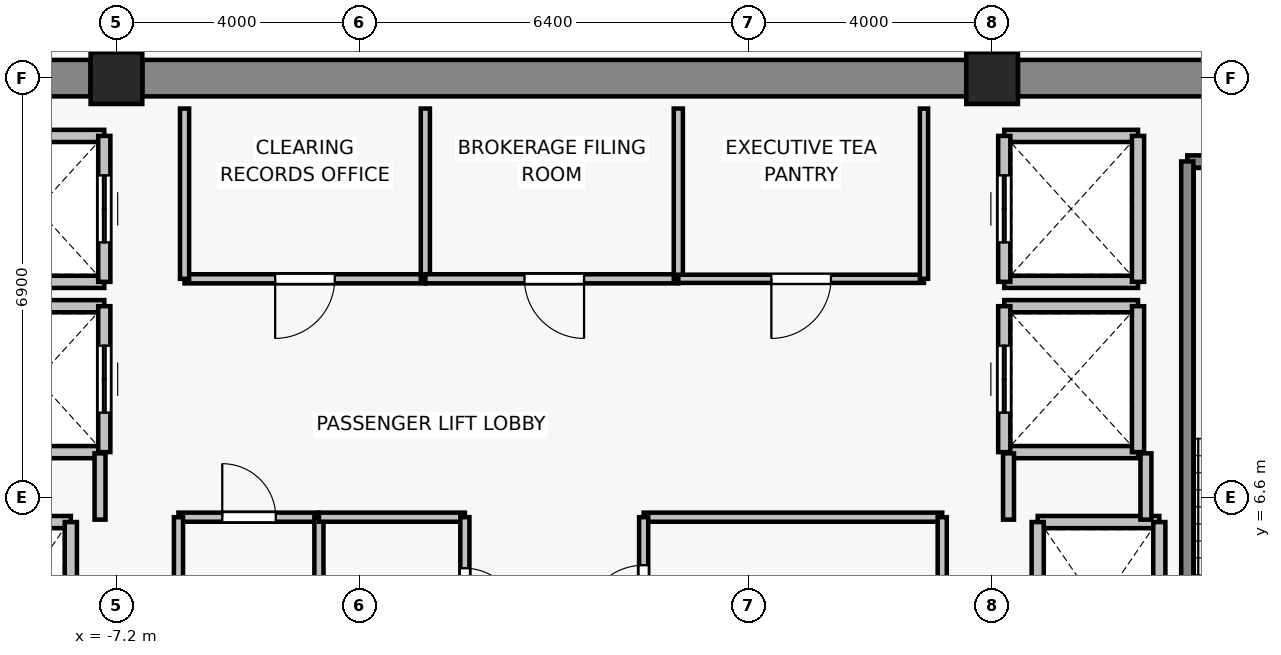
"""IFC4 building model, lengths in metres.
Left out: names, types, materials, properties, quantities, classifications, styles, units other than length and angle.
Written with IfcOpenShell. Run it as: python <this file> out.ifc"""

import sys

from ifc_helpers import new_model, si_unit, direction, frame, frame_2d, origin, origin_2d, place, context, subcontext, project, spatial, rectangle, extrude, source, transform, mapped, element, fill, save


model = new_model("IFC4")
c1 = context("Model", 3, precision=1e-05, world=origin(), true_north=direction((0.0, 1.0)))
c2 = subcontext(c1, "Body", "Model", "MODEL_VIEW")
j1 = project(units=[si_unit("LENGTHUNIT", "METRE"), si_unit("PLANEANGLEUNIT", "RADIAN")], contexts=[c1])
p1 = place(None, origin())
s1 = spatial("IfcSite", under=j1, at=p1, CompositionType="ELEMENT")
p2 = place(p1, origin())
s2 = spatial("IfcBuilding", under=s1, at=p2, CompositionType="ELEMENT")
p3 = place(p2, frame((0.0, 0.0, 208.9)))
s3 = spatial("IfcBuildingStorey", under=s2, at=p3, CompositionType="ELEMENT", Elevation=208.9)
for number, where, z_axis, x_axis in (
    (1, (-7.2, 13.5, 0.0), (0.0, 0.0, 1.0), (1.0, 0.0, 0.0)),
    (2, (7.2, 13.5, 0.0), (0.0, 0.0, 1.0), (1.0, 0.0, 0.0)),
):
    element("IfcColumn", number, at=place(p3, frame(where, z_axis=z_axis, x_axis=x_axis)), inside=s3, PredefinedType="COLUMN", context=c2, shape_type="SweptSolid", body=[
        extrude(rectangle(XDim=0.85, YDim=0.85, at=origin_2d()), origin(), (0.0, 0.0, 1.0), 3.3),
    ])
p4 = place(p3, frame((-13.975, 13.5, 0.0), z_axis=(0.0, 0.0, 1.0), x_axis=(1.0, 0.0, 0.0)))
e3 = element("IfcWall", 3, at=p4, inside=s3, PredefinedType="SHEAR", context=c2, shape_type="SweptSolid", body=[
    extrude(rectangle(XDim=6.35, YDim=0.6, at=frame_2d((3.175, 0.0))), origin(), (0.0, 0.0, 1.0), 3.075),
])
p5 = place(p3, frame((-6.775, 13.5, 0.0), z_axis=(0.0, 0.0, 1.0), x_axis=(1.0, 0.0, 0.0)))
e4 = element("IfcWall", 4, at=p5, inside=s3, PredefinedType="SHEAR", context=c2, shape_type="SweptSolid", body=[
    extrude(rectangle(XDim=13.55, YDim=0.6, at=frame_2d((6.775, 0.0))), origin(), (0.0, 0.0, 1.0), 3.075),
])
p6 = place(p3, frame((7.625, 13.5, 0.0), z_axis=(0.0, 0.0, 1.0), x_axis=(1.0, 0.0, 0.0)))
e5 = element("IfcWall", 5, at=p6, inside=s3, PredefinedType="SHEAR", context=c2, shape_type="SweptSolid", body=[
    extrude(rectangle(XDim=6.35, YDim=0.6, at=frame_2d((3.175, 0.0))), origin(), (0.0, 0.0, 1.0), 3.075),
])
p7 = place(p3, frame((-9.95, 6.2, 0.0), z_axis=(0.0, 0.0, 1.0), x_axis=(1.0, 0.0, 0.0)))
e6 = element("IfcWall", 6, at=p7, inside=s3, PredefinedType="SOLIDWALL", context=c2, shape_type="SweptSolid", body=[
    extrude(rectangle(XDim=2.0, YDim=0.2, at=frame_2d((1.0, 0.0))), origin(), (0.0, 0.0, 1.0), 3.075),
])
p8 = place(p3, frame((-7.95, 6.2, 0.0), z_axis=(0.0, 0.0, 1.0), x_axis=(0.0, -1.0, 0.0)))
e7 = element("IfcWall", 7, at=p8, inside=s3, PredefinedType="SOLIDWALL", context=c2, shape_type="SweptSolid", body=[
    extrude(rectangle(XDim=2.8, YDim=0.2, at=frame_2d((1.4, 0.0))), origin(), (0.0, 0.0, 1.0), 3.075),
])
p9 = place(p3, frame((7.95, 6.2, 0.0), z_axis=(0.0, 0.0, 1.0), x_axis=(1.0, 0.0, 0.0)))
e8 = element("IfcWall", 8, at=p9, inside=s3, PredefinedType="SOLIDWALL", context=c2, shape_type="SweptSolid", body=[
    extrude(rectangle(XDim=2.0, YDim=0.2, at=frame_2d((1.0, 0.0))), origin(), (0.0, 0.0, 1.0), 3.075),
])
for number, where, z_axis, x_axis in (
    (9, (7.95, 3.4, 0.0), (0.0, 0.0, 1.0), (0.0, 1.0, 0.0)),
    (10, (9.95, 6.2, 0.0), (0.0, 0.0, 1.0), (0.0, -1.0, 0.0)),
):
    element("IfcWall", number, at=place(p3, frame(where, z_axis=z_axis, x_axis=x_axis)), inside=s3, PredefinedType="SOLIDWALL", context=c2, shape_type="SweptSolid", body=[
        extrude(rectangle(XDim=2.8, YDim=0.2, at=frame_2d((1.4, 0.0))), origin(), (0.0, 0.0, 1.0), 3.075),
    ])
for number, where, z_axis, x_axis in (
    (11, (-7.4, 7.35, 0.0), (0.0, 0.0, 1.0), (-1.0, 0.0, 0.0)),
    (12, (-9.6, 9.75, 0.0), (0.0, 0.0, 1.0), (1.0, 0.0, 0.0)),
):
    element("IfcWall", number, at=place(p3, frame(where, z_axis=z_axis, x_axis=x_axis)), inside=s3, PredefinedType="SOLIDWALL", context=c2, shape_type="SweptSolid", body=[
        extrude(rectangle(XDim=2.2, YDim=0.2, at=frame_2d((1.1, 0.0))), origin(), (0.0, 0.0, 1.0), 2.615),
    ])
p10 = place(p3, frame((-7.4, 9.75, 0.0), z_axis=(0.0, 0.0, 1.0), x_axis=(0.0, -1.0, 0.0)))
e13 = element("IfcWall", 13, at=p10, inside=s3, PredefinedType="SOLIDWALL", context=c2, shape_type="SweptSolid", body=[
    extrude(rectangle(XDim=2.4, YDim=0.2, at=frame_2d((1.2, 0.0))), origin(), (0.0, 0.0, 1.0), 2.615),
])
p11 = place(p10, frame((0.65, 0.0, 0.0)))
e14 = element("IfcOpeningElement", 14, at=p11, cuts=e13, PredefinedType="OPENING", context=c2, shape_type="SweptSolid", body=[
    extrude(rectangle(XDim=1.1, YDim=2.2, at=frame_2d((0.55, 1.1))), frame((0.0, 0.11, 0.0), z_axis=(0.0, -1.0, 0.0), x_axis=(1.0, 0.0, 0.0)), (0.0, 0.0, 1.0), 0.22),
])
for number, where, z_axis, x_axis in (
    (15, (-7.4, 10.15, 0.0), (0.0, 0.0, 1.0), (-1.0, 0.0, 0.0)),
    (16, (-9.6, 12.55, 0.0), (0.0, 0.0, 1.0), (1.0, 0.0, 0.0)),
):
    element("IfcWall", number, at=place(p3, frame(where, z_axis=z_axis, x_axis=x_axis)), inside=s3, PredefinedType="SOLIDWALL", context=c2, shape_type="SweptSolid", body=[
        extrude(rectangle(XDim=2.2, YDim=0.2, at=frame_2d((1.1, 0.0))), origin(), (0.0, 0.0, 1.0), 2.615),
    ])
p12 = place(p3, frame((-7.4, 12.55, 0.0), z_axis=(0.0, 0.0, 1.0), x_axis=(0.0, -1.0, 0.0)))
e17 = element("IfcWall", 17, at=p12, inside=s3, PredefinedType="SOLIDWALL", context=c2, shape_type="SweptSolid", body=[
    extrude(rectangle(XDim=2.4, YDim=0.2, at=frame_2d((1.2, 0.0))), origin(), (0.0, 0.0, 1.0), 2.615),
])
p13 = place(p12, frame((0.65, 0.0, 0.0)))
e18 = element("IfcOpeningElement", 18, at=p13, cuts=e17, PredefinedType="OPENING", context=c2, shape_type="SweptSolid", body=[
    extrude(rectangle(XDim=1.1, YDim=2.2, at=frame_2d((0.55, 1.1))), frame((0.0, 0.11, 0.0), z_axis=(0.0, -1.0, 0.0), x_axis=(1.0, 0.0, 0.0)), (0.0, 0.0, 1.0), 0.22),
])
for number, where, z_axis, x_axis in (
    (19, (9.6, 7.35, 0.0), (0.0, 0.0, 1.0), (-1.0, 0.0, 0.0)),
    (20, (7.4, 9.75, 0.0), (0.0, 0.0, 1.0), (1.0, 0.0, 0.0)),
):
    element("IfcWall", number, at=place(p3, frame(where, z_axis=z_axis, x_axis=x_axis)), inside=s3, PredefinedType="SOLIDWALL", context=c2, shape_type="SweptSolid", body=[
        extrude(rectangle(XDim=2.2, YDim=0.2, at=frame_2d((1.1, 0.0))), origin(), (0.0, 0.0, 1.0), 2.615),
    ])
p14 = place(p3, frame((7.4, 7.35, 0.0), z_axis=(0.0, 0.0, 1.0), x_axis=(0.0, 1.0, 0.0)))
e21 = element("IfcWall", 21, at=p14, inside=s3, PredefinedType="SOLIDWALL", context=c2, shape_type="SweptSolid", body=[
    extrude(rectangle(XDim=2.4, YDim=0.2, at=frame_2d((1.2, 0.0))), origin(), (0.0, 0.0, 1.0), 2.615),
])
p15 = place(p14, frame((0.65, 0.0, 0.0)))
e22 = element("IfcOpeningElement", 22, at=p15, cuts=e21, PredefinedType="OPENING", context=c2, shape_type="SweptSolid", body=[
    extrude(rectangle(XDim=1.1, YDim=2.2, at=frame_2d((0.55, 1.1))), frame((0.0, 0.11, 0.0), z_axis=(0.0, -1.0, 0.0), x_axis=(1.0, 0.0, 0.0)), (0.0, 0.0, 1.0), 0.22),
])
p16 = place(p3, frame((9.6, 9.75, 0.0), z_axis=(0.0, 0.0, 1.0), x_axis=(0.0, -1.0, 0.0)))
e23 = element("IfcWall", 23, at=p16, inside=s3, PredefinedType="SOLIDWALL", context=c2, shape_type="SweptSolid", body=[
    extrude(rectangle(XDim=2.4, YDim=0.2, at=frame_2d((1.2, 0.0))), origin(), (0.0, 0.0, 1.0), 3.075),
])
for number, where, z_axis, x_axis in (
    (24, (9.6, 10.15, 0.0), (0.0, 0.0, 1.0), (-1.0, 0.0, 0.0)),
    (25, (7.4, 12.55, 0.0), (0.0, 0.0, 1.0), (1.0, 0.0, 0.0)),
):
    element("IfcWall", number, at=place(p3, frame(where, z_axis=z_axis, x_axis=x_axis)), inside=s3, PredefinedType="SOLIDWALL", context=c2, shape_type="SweptSolid", body=[
        extrude(rectangle(XDim=2.2, YDim=0.2, at=frame_2d((1.1, 0.0))), origin(), (0.0, 0.0, 1.0), 2.615),
    ])
p17 = place(p3, frame((7.4, 10.15, 0.0), z_axis=(0.0, 0.0, 1.0), x_axis=(0.0, 1.0, 0.0)))
e26 = element("IfcWall", 26, at=p17, inside=s3, PredefinedType="SOLIDWALL", context=c2, shape_type="SweptSolid", body=[
    extrude(rectangle(XDim=2.4, YDim=0.2, at=frame_2d((1.2, 0.0))), origin(), (0.0, 0.0, 1.0), 2.615),
])
p18 = place(p17, frame((0.65, 0.0, 0.0)))
e27 = element("IfcOpeningElement", 27, at=p18, cuts=e26, PredefinedType="OPENING", context=c2, shape_type="SweptSolid", body=[
    extrude(rectangle(XDim=1.1, YDim=2.2, at=frame_2d((0.55, 1.1))), frame((0.0, 0.11, 0.0), z_axis=(0.0, -1.0, 0.0), x_axis=(1.0, 0.0, 0.0)), (0.0, 0.0, 1.0), 0.22),
])
p19 = place(p3, frame((9.6, 12.55, 0.0), z_axis=(0.0, 0.0, 1.0), x_axis=(0.0, -1.0, 0.0)))
e28 = element("IfcWall", 28, at=p19, inside=s3, PredefinedType="SOLIDWALL", context=c2, shape_type="SweptSolid", body=[
    extrude(rectangle(XDim=2.4, YDim=0.2, at=frame_2d((1.2, 0.0))), origin(), (0.0, 0.0, 1.0), 3.075),
])
p20 = place(p3, frame((10.41, 12.13, 0.0), z_axis=(0.0, 0.0, 1.0), x_axis=(1.0, 0.0, 0.0)))
e29 = element("IfcWall", 29, at=p20, inside=s3, PredefinedType="SOLIDWALL", context=c2, shape_type="SweptSolid", body=[
    extrude(rectangle(XDim=3.52, YDim=0.2, at=frame_2d((1.76, 0.0))), origin(), (0.0, 0.0, 1.0), 3.075),
])
p21 = place(p3, frame((10.41, 3.29, 0.0), z_axis=(0.0, 0.0, 1.0), x_axis=(0.0, 1.0, 0.0)))
e30 = element("IfcWall", 30, at=p21, inside=s3, PredefinedType="SOLIDWALL", context=c2, shape_type="SweptSolid", body=[
    extrude(rectangle(XDim=8.84, YDim=0.2, at=frame_2d((4.42, 0.0))), origin(), (0.0, 0.0, 1.0), 3.075),
])
for number, where, z_axis, x_axis in (
    (31, (-7.47, 7.33, 0.0), (0.0, 0.0, 1.0), (0.0, -1.0, 0.0)),
    (32, (7.47, 6.24, 0.0), (0.0, 0.0, 1.0), (0.0, 1.0, 0.0)),
):
    element("IfcWall", number, at=place(p3, frame(where, z_axis=z_axis, x_axis=x_axis)), inside=s3, PredefinedType="PARTITIONING", context=c2, shape_type="SweptSolid", body=[
        extrude(rectangle(XDim=1.09, YDim=0.18, at=frame_2d((0.545, 0.0))), origin(), (0.0, 0.0, 1.0), 2.615),
    ])
p22 = place(p3, frame((9.73, 7.33, 0.0), z_axis=(0.0, 0.0, 1.0), x_axis=(0.0, -1.0, 0.0)))
e33 = element("IfcWall", 33, at=p22, inside=s3, PredefinedType="PARTITIONING", context=c2, shape_type="SweptSolid", body=[
    extrude(rectangle(XDim=1.09, YDim=0.18, at=frame_2d((0.545, 0.0))), origin(), (0.0, 0.0, 1.0), 3.075),
])
p23 = place(p3, frame((-2.12, 10.2, 0.0), z_axis=(0.0, 0.0, 1.0), x_axis=(-1.0, 0.0, 0.0)))
e34 = element("IfcWall", 34, at=p23, inside=s3, PredefinedType="PARTITIONING", context=c2, shape_type="SweptSolid", body=[
    extrude(rectangle(XDim=3.96, YDim=0.15, at=frame_2d((1.98, 0.0))), origin(), (0.0, 0.0, 1.0), 3.075),
])
p24 = place(p23, frame((1.49, 0.0, 0.0)))
e35 = element("IfcOpeningElement", 35, at=p24, cuts=e34, PredefinedType="OPENING", context=c2, shape_type="SweptSolid", body=[
    extrude(rectangle(XDim=0.98, YDim=2.15, at=frame_2d((0.49, 1.075))), frame((0.0, 0.085, 0.0), z_axis=(0.0, -1.0, 0.0), x_axis=(1.0, 0.0, 0.0)), (0.0, 0.0, 1.0), 0.17),
])
for number, where, z_axis, x_axis in (
    (36, (-6.08, 10.2, 0.0), (0.0, 0.0, 1.0), (0.0, 1.0, 0.0)),
    (37, (-2.12, 13.0, 0.0), (0.0, 0.0, 1.0), (0.0, -1.0, 0.0)),
):
    element("IfcWall", number, at=place(p3, frame(where, z_axis=z_axis, x_axis=x_axis)), inside=s3, PredefinedType="PARTITIONING", context=c2, shape_type="SweptSolid", body=[
        extrude(rectangle(XDim=2.8, YDim=0.15, at=frame_2d((1.4, 0.0))), origin(), (0.0, 0.0, 1.0), 3.075),
    ])
p25 = place(p3, frame((2.04, 10.2, 0.0), z_axis=(0.0, 0.0, 1.0), x_axis=(-1.0, 0.0, 0.0)))
e38 = element("IfcWall", 38, at=p25, inside=s3, PredefinedType="PARTITIONING", context=c2, shape_type="SweptSolid", body=[
    extrude(rectangle(XDim=4.16, YDim=0.15, at=frame_2d((2.08, 0.0))), origin(), (0.0, 0.0, 1.0), 3.075),
])
p26 = place(p25, frame((1.55, 0.0, 0.0)))
e39 = element("IfcOpeningElement", 39, at=p26, cuts=e38, PredefinedType="OPENING", context=c2, shape_type="SweptSolid", body=[
    extrude(rectangle(XDim=0.98, YDim=2.15, at=frame_2d((0.49, 1.075))), frame((0.0, 0.085, 0.0), z_axis=(0.0, -1.0, 0.0), x_axis=(1.0, 0.0, 0.0)), (0.0, 0.0, 1.0), 0.17),
])
p27 = place(p3, frame((2.04, 13.0, 0.0), z_axis=(0.0, 0.0, 1.0), x_axis=(0.0, -1.0, 0.0)))
e40 = element("IfcWall", 40, at=p27, inside=s3, PredefinedType="PARTITIONING", context=c2, shape_type="SweptSolid", body=[
    extrude(rectangle(XDim=2.8, YDim=0.15, at=frame_2d((1.4, 0.0))), origin(), (0.0, 0.0, 1.0), 3.075),
])
p28 = place(p3, frame((6.08, 10.2, 0.0), z_axis=(0.0, 0.0, 1.0), x_axis=(-1.0, 0.0, 0.0)))
e41 = element("IfcWall", 41, at=p28, inside=s3, PredefinedType="PARTITIONING", context=c2, shape_type="SweptSolid", body=[
    extrude(rectangle(XDim=4.04, YDim=0.135, at=frame_2d((2.02, 0.0))), origin(), (0.0, 0.0, 1.0), 3.075),
])
p29 = place(p28, frame((1.53, 0.0, 0.0)))
e42 = element("IfcOpeningElement", 42, at=p29, cuts=e41, PredefinedType="OPENING", context=c2, shape_type="SweptSolid", body=[
    extrude(rectangle(XDim=0.98, YDim=2.15, at=frame_2d((0.49, 1.075))), frame((0.0, 0.077, 0.0), z_axis=(0.0, -1.0, 0.0), x_axis=(1.0, 0.0, 0.0)), (0.0, 0.0, 1.0), 0.155),
])
p30 = place(p3, frame((6.08, 13.0, 0.0), z_axis=(0.0, 0.0, 1.0), x_axis=(0.0, -1.0, 0.0)))
e43 = element("IfcWall", 43, at=p30, inside=s3, PredefinedType="PARTITIONING", context=c2, shape_type="SweptSolid", body=[
    extrude(rectangle(XDim=2.8, YDim=0.135, at=frame_2d((1.4, 0.0))), origin(), (0.0, 0.0, 1.0), 3.075),
])
p31 = place(p3, frame((-6.18, 6.28, 0.0), z_axis=(0.0, 0.0, 1.0), x_axis=(1.0, 0.0, 0.0)))
e44 = element("IfcWall", 44, at=p31, inside=s3, PredefinedType="PARTITIONING", context=c2, shape_type="SweptSolid", body=[
    extrude(rectangle(XDim=2.31, YDim=0.15, at=frame_2d((1.155, 0.0))), origin(), (0.0, 0.0, 1.0), 3.075),
])
p32 = place(p31, frame((0.72, 0.0, 0.0)))
e45 = element("IfcOpeningElement", 45, at=p32, cuts=e44, PredefinedType="OPENING", context=c2, shape_type="SweptSolid", body=[
    extrude(rectangle(XDim=0.88, YDim=2.1, at=frame_2d((0.44, 1.05))), frame((0.0, 0.085, 0.0), z_axis=(0.0, -1.0, 0.0), x_axis=(1.0, 0.0, 0.0)), (0.0, 0.0, 1.0), 0.17),
])
for number, where, z_axis, x_axis in (
    (46, (-6.18, 3.76, 0.0), (0.0, 0.0, 1.0), (0.0, 1.0, 0.0)),
    (47, (-3.87, 6.28, 0.0), (0.0, 0.0, 1.0), (0.0, -1.0, 0.0)),
):
    element("IfcWall", number, at=place(p3, frame(where, z_axis=z_axis, x_axis=x_axis)), inside=s3, PredefinedType="PARTITIONING", context=c2, shape_type="SweptSolid", body=[
        extrude(rectangle(XDim=2.52, YDim=0.15, at=frame_2d((1.26, 0.0))), origin(), (0.0, 0.0, 1.0), 3.075),
    ])
p33 = place(p3, frame((-3.87, 6.28, 0.0), z_axis=(0.0, 0.0, 1.0), x_axis=(1.0, 0.0, 0.0)))
e48 = element("IfcWall", 48, at=p33, inside=s3, PredefinedType="PARTITIONING", context=c2, shape_type="SweptSolid", body=[
    extrude(rectangle(XDim=2.4, YDim=0.15, at=frame_2d((1.2, 0.0))), origin(), (0.0, 0.0, 1.0), 3.075),
])
p34 = place(p3, frame((-1.47, 6.28, 0.0), z_axis=(0.0, 0.0, 1.0), x_axis=(0.0, -1.0, 0.0)))
e49 = element("IfcWall", 49, at=p34, inside=s3, PredefinedType="PARTITIONING", context=c2, shape_type="SweptSolid", body=[
    extrude(rectangle(XDim=2.52, YDim=0.15, at=frame_2d((1.26, 0.0))), origin(), (0.0, 0.0, 1.0), 3.075),
])
p35 = place(p34, frame((0.84, 0.0, 0.0)))
e50 = element("IfcOpeningElement", 50, at=p35, cuts=e49, PredefinedType="OPENING", context=c2, shape_type="SweptSolid", body=[
    extrude(rectangle(XDim=0.88, YDim=2.1, at=frame_2d((0.44, 1.05))), frame((0.0, 0.085, 0.0), z_axis=(0.0, -1.0, 0.0), x_axis=(1.0, 0.0, 0.0)), (0.0, 0.0, 1.0), 0.17),
])
p36 = place(p3, frame((1.47, 6.28, 0.0), z_axis=(0.0, 0.0, 1.0), x_axis=(1.0, 0.0, 0.0)))
e51 = element("IfcWall", 51, at=p36, inside=s3, PredefinedType="PARTITIONING", context=c2, shape_type="SweptSolid", body=[
    extrude(rectangle(XDim=4.91, YDim=0.15, at=frame_2d((2.455, 0.0))), origin(), (0.0, 0.0, 1.0), 3.075),
])
p37 = place(p3, frame((1.47, 3.76, 0.0), z_axis=(0.0, 0.0, 1.0), x_axis=(0.0, 1.0, 0.0)))
e52 = element("IfcWall", 52, at=p37, inside=s3, PredefinedType="PARTITIONING", context=c2, shape_type="SweptSolid", body=[
    extrude(rectangle(XDim=2.52, YDim=0.15, at=frame_2d((1.26, 0.0))), origin(), (0.0, 0.0, 1.0), 3.075),
])
p38 = place(p37, frame((0.75, 0.0, 0.0)))
e53 = element("IfcOpeningElement", 53, at=p38, cuts=e52, PredefinedType="OPENING", context=c2, shape_type="SweptSolid", body=[
    extrude(rectangle(XDim=0.98, YDim=2.15, at=frame_2d((0.49, 1.075))), frame((0.0, 0.085, 0.0), z_axis=(0.0, -1.0, 0.0), x_axis=(1.0, 0.0, 0.0)), (0.0, 0.0, 1.0), 0.17),
])
p39 = place(p3, frame((6.38, 6.28, 0.0), z_axis=(0.0, 0.0, 1.0), x_axis=(0.0, -1.0, 0.0)))
e54 = element("IfcWall", 54, at=p39, inside=s3, PredefinedType="PARTITIONING", context=c2, shape_type="SweptSolid", body=[
    extrude(rectangle(XDim=2.52, YDim=0.15, at=frame_2d((1.26, 0.0))), origin(), (0.0, 0.0, 1.0), 3.075),
])
m1 = source(origin(), c2, "Body", "SweptSolid", [
    extrude(rectangle(XDim=1.1, YDim=2.2, at=frame_2d((0.55, 1.1))), frame((0.0, 0.025, 0.0), z_axis=(0.0, -1.0, 0.0), x_axis=(1.0, 0.0, 0.0)), (0.0, 0.0, 1.0), 0.05),
])
p40 = place(p11, origin())
e55 = element("IfcDoor", 55, at=p40, inside=s3, OperationType="DOUBLE_DOOR_SLIDING", PredefinedType="DOOR", context=c2, shape_type="MappedRepresentation", body=[
    mapped(m1, transform((0.0, 0.0, 0.0), x_axis=(1.0, 0.0, 0.0), y_axis=(0.0, 1.0, 0.0), z_axis=(0.0, 0.0, 1.0), scale=1.0)),
])
fill(e14, e55)
p41 = place(p13, origin())
e56 = element("IfcDoor", 56, at=p41, inside=s3, OperationType="DOUBLE_DOOR_SLIDING", PredefinedType="DOOR", context=c2, shape_type="MappedRepresentation", body=[
    mapped(m1, transform((0.0, 0.0, 0.0), x_axis=(1.0, 0.0, 0.0), y_axis=(0.0, 1.0, 0.0), z_axis=(0.0, 0.0, 1.0), scale=1.0)),
])
fill(e18, e56)
p42 = place(p15, origin())
e57 = element("IfcDoor", 57, at=p42, inside=s3, OperationType="DOUBLE_DOOR_SLIDING", PredefinedType="DOOR", context=c2, shape_type="MappedRepresentation", body=[
    mapped(m1, transform((0.0, 0.0, 0.0), x_axis=(1.0, 0.0, 0.0), y_axis=(0.0, 1.0, 0.0), z_axis=(0.0, 0.0, 1.0), scale=1.0)),
])
fill(e22, e57)
p43 = place(p18, origin())
e58 = element("IfcDoor", 58, at=p43, inside=s3, OperationType="DOUBLE_DOOR_SLIDING", PredefinedType="DOOR", context=c2, shape_type="MappedRepresentation", body=[
    mapped(m1, transform((0.0, 0.0, 0.0), x_axis=(1.0, 0.0, 0.0), y_axis=(0.0, 1.0, 0.0), z_axis=(0.0, 0.0, 1.0), scale=1.0)),
])
fill(e27, e58)
m2 = source(origin(), c2, "Body", "SweptSolid", [
    extrude(rectangle(XDim=0.98, YDim=2.15, at=frame_2d((0.49, 1.075))), frame((0.0, 0.025, 0.0), z_axis=(0.0, -1.0, 0.0), x_axis=(1.0, 0.0, 0.0)), (0.0, 0.0, 1.0), 0.05),
])
p44 = place(p24, origin())
e59 = element("IfcDoor", 59, at=p44, inside=s3, OperationType="SINGLE_SWING_RIGHT", PredefinedType="DOOR", context=c2, shape_type="MappedRepresentation", body=[
    mapped(m2, transform((0.0, 0.0, 0.0), x_axis=(1.0, 0.0, 0.0), y_axis=(0.0, 1.0, 0.0), z_axis=(0.0, 0.0, 1.0), scale=1.0)),
])
fill(e35, e59)
p45 = place(p26, origin())
e60 = element("IfcDoor", 60, at=p45, inside=s3, OperationType="SINGLE_SWING_LEFT", PredefinedType="DOOR", context=c2, shape_type="MappedRepresentation", body=[
    mapped(m2, transform((0.0, 0.0, 0.0), x_axis=(1.0, 0.0, 0.0), y_axis=(0.0, 1.0, 0.0), z_axis=(0.0, 0.0, 1.0), scale=1.0)),
])
fill(e39, e60)
p46 = place(p29, origin())
e61 = element("IfcDoor", 61, at=p46, inside=s3, OperationType="SINGLE_SWING_RIGHT", PredefinedType="DOOR", context=c2, shape_type="MappedRepresentation", body=[
    mapped(m2, transform((0.0, 0.0, 0.0), x_axis=(1.0, 0.0, 0.0), y_axis=(0.0, 1.0, 0.0), z_axis=(0.0, 0.0, 1.0), scale=1.0)),
])
fill(e42, e61)
m3 = source(origin(), c2, "Body", "SweptSolid", [
    extrude(rectangle(XDim=0.88, YDim=2.1, at=frame_2d((0.44, 1.05))), frame((0.0, 0.025, 0.0), z_axis=(0.0, -1.0, 0.0), x_axis=(1.0, 0.0, 0.0)), (0.0, 0.0, 1.0), 0.05),
])
p47 = place(p32, origin())
e62 = element("IfcDoor", 62, at=p47, inside=s3, OperationType="SINGLE_SWING_LEFT", PredefinedType="DOOR", context=c2, shape_type="MappedRepresentation", body=[
    mapped(m3, transform((0.0, 0.0, 0.0), x_axis=(1.0, 0.0, 0.0), y_axis=(0.0, 1.0, 0.0), z_axis=(0.0, 0.0, 1.0), scale=1.0)),
])
fill(e45, e62)
p48 = place(p35, origin())
e63 = element("IfcDoor", 63, at=p48, inside=s3, OperationType="SINGLE_SWING_RIGHT", PredefinedType="DOOR", context=c2, shape_type="MappedRepresentation", body=[
    mapped(m3, transform((0.0, 0.0, 0.0), x_axis=(1.0, 0.0, 0.0), y_axis=(0.0, 1.0, 0.0), z_axis=(0.0, 0.0, 1.0), scale=1.0)),
])
fill(e50, e63)
p49 = place(p38, origin())
e64 = element("IfcDoor", 64, at=p49, inside=s3, OperationType="SINGLE_SWING_LEFT", PredefinedType="DOOR", context=c2, shape_type="MappedRepresentation", body=[
    mapped(m2, transform((0.0, 0.0, 0.0), x_axis=(1.0, 0.0, 0.0), y_axis=(0.0, 1.0, 0.0), z_axis=(0.0, 0.0, 1.0), scale=1.0)),
])
fill(e53, e64)
save(model, sys.argv[1])
